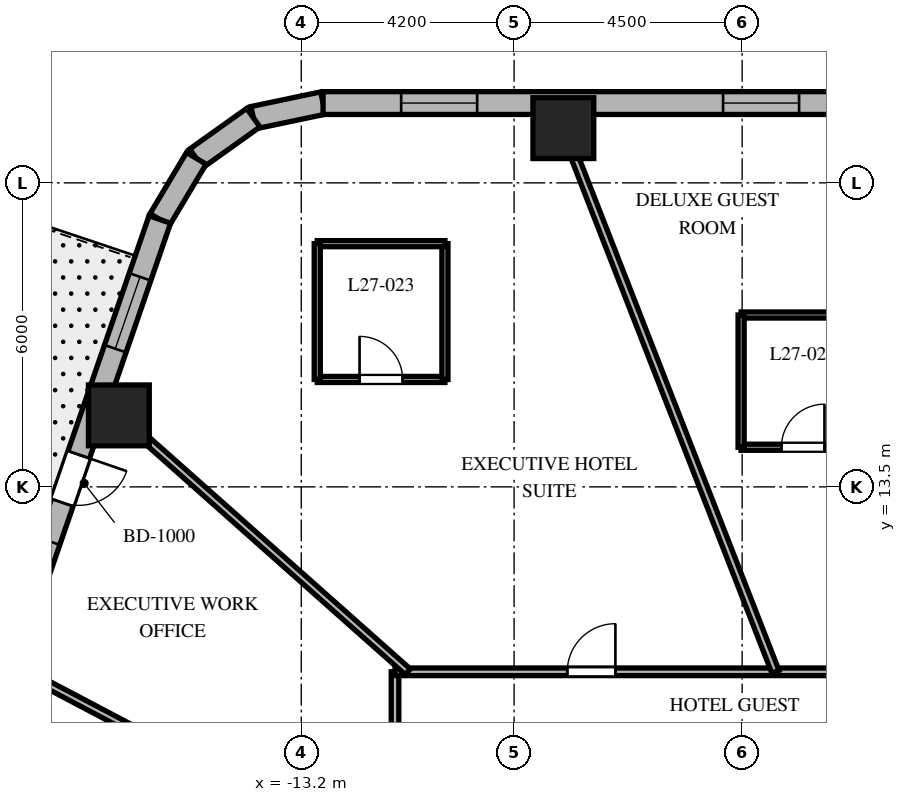
"""IFC4 building model, lengths in metres.
Left out: names, types, materials, properties, quantities, classifications, styles, units other than length and angle.
Written with IfcOpenShell. Run it as: python <this file> out.ifc"""

import sys

from ifc_helpers import new_model, si_unit, direction, frame, frame_2d, origin, origin_2d, place, context, subcontext, project, spatial, rectangle, extrude, element, fill, save


model = new_model("IFC4")
c1 = context("Model", 3, precision=1e-05, world=origin(), true_north=direction((0.0, 1.0)))
c2 = subcontext(c1, "Body", "Model", "MODEL_VIEW")
j1 = project(units=[si_unit("LENGTHUNIT", "METRE"), si_unit("PLANEANGLEUNIT", "RADIAN")], contexts=[c1])
p1 = place(None, origin())
s1 = spatial("IfcSite", under=j1, at=p1, CompositionType="ELEMENT")
p2 = place(p1, origin())
s2 = spatial("IfcBuilding", under=s1, at=p2, CompositionType="ELEMENT")
p3 = place(p2, frame((0.0, 0.0, 113.6)))
s3 = spatial("IfcBuildingStorey", under=s2, at=p3, CompositionType="ELEMENT", Elevation=113.6)
for number, where, z_axis, x_axis in (
    (1, (-8.028, 20.58, 0.0), (0.0, 0.0, 1.0), (1.0, 0.0, 0.0)),
    (2, (-16.8, 14.911, 0.0), (0.0, 0.0, 1.0), (1.0, 0.0, 0.0)),
):
    element("IfcColumn", number, at=place(p3, frame(where, z_axis=z_axis, x_axis=x_axis)), inside=s3, PredefinedType="COLUMN", context=c2, shape_type="SweptSolid", body=[
        extrude(rectangle(XDim=1.2, YDim=1.2, at=origin_2d()), origin(), (0.0, 0.0, 1.0), 3.7),
    ])
p4 = place(p3, frame((-12.771, 21.075, 0.0), z_axis=(0.0, 0.0, 1.0), x_axis=(-0.97874281988, -0.205091424819, 0.0)))
e3 = element("IfcWall", 3, at=p4, inside=s3, PredefinedType="SOLIDWALL", context=c2, shape_type="SweptSolid", body=[
    extrude(rectangle(XDim=1.406, YDim=0.45, at=frame_2d((0.703, 0.0))), origin(), (0.0, 0.0, 1.0), 3.4),
])
p5 = place(p3, frame((-14.146, 20.787, 0.0), z_axis=(0.0, 0.0, 1.0), x_axis=(-0.814162929117, -0.580636482536, 0.0)))
e4 = element("IfcWall", 4, at=p5, inside=s3, PredefinedType="SOLIDWALL", context=c2, shape_type="SweptSolid", body=[
    extrude(rectangle(XDim=1.382, YDim=0.45, at=frame_2d((0.691, 0.0))), origin(), (0.0, 0.0, 1.0), 3.4),
])
p6 = place(p3, frame((-15.272, 19.984, 0.0), z_axis=(0.0, 0.0, 1.0), x_axis=(-0.512579347361, -0.858639862025, 0.0)))
e5 = element("IfcWall", 5, at=p6, inside=s3, PredefinedType="SOLIDWALL", context=c2, shape_type="SweptSolid", body=[
    extrude(rectangle(XDim=1.406, YDim=0.45, at=frame_2d((0.703, 0.0))), origin(), (0.0, 0.0, 1.0), 3.4),
])
p7 = place(p3, frame((11.012, 21.075, 0.0), z_axis=(0.0, 0.0, 1.0), x_axis=(-1.0, 0.0, 0.0)))
e6 = element("IfcWall", 6, at=p7, inside=s3, PredefinedType="SOLIDWALL", context=c2, shape_type="SweptSolid", body=[
    extrude(rectangle(XDim=23.782, YDim=0.45, at=frame_2d((11.891, 0.0))), origin(), (0.0, 0.0, 1.0), 3.4),
])
p8 = place(p7, frame((1.542, 0.0, 0.8)))
e7 = element("IfcOpeningElement", 7, at=p8, cuts=e6, PredefinedType="OPENING", context=c2, shape_type="SweptSolid", body=[
    extrude(rectangle(XDim=1.5, YDim=1.8, at=frame_2d((0.75, 0.9))), frame((0.0, 0.235, 0.0), z_axis=(0.0, -1.0, 0.0), x_axis=(1.0, 0.0, 0.0)), (0.0, 0.0, 1.0), 0.47),
])
p9 = place(p7, frame((7.82, 0.0, 0.8)))
e8 = element("IfcOpeningElement", 8, at=p9, cuts=e6, PredefinedType="OPENING", context=c2, shape_type="SweptSolid", body=[
    extrude(rectangle(XDim=1.5, YDim=1.8, at=frame_2d((0.75, 0.9))), frame((0.0, 0.235, 0.0), z_axis=(0.0, -1.0, 0.0), x_axis=(1.0, 0.0, 0.0)), (0.0, 0.0, 1.0), 0.47),
])
p10 = place(p7, frame((14.388, 0.0, 0.8)))
e9 = element("IfcOpeningElement", 9, at=p10, cuts=e6, PredefinedType="OPENING", context=c2, shape_type="SweptSolid", body=[
    extrude(rectangle(XDim=1.5, YDim=1.8, at=frame_2d((0.75, 0.9))), frame((0.0, 0.235, 0.0), z_axis=(0.0, -1.0, 0.0), x_axis=(1.0, 0.0, 0.0)), (0.0, 0.0, 1.0), 0.47),
])
p11 = place(p7, frame((20.741, 0.0, 0.8)))
e10 = element("IfcOpeningElement", 10, at=p11, cuts=e6, PredefinedType="OPENING", context=c2, shape_type="SweptSolid", body=[
    extrude(rectangle(XDim=1.5, YDim=1.8, at=frame_2d((0.75, 0.9))), frame((0.0, 0.235, 0.0), z_axis=(0.0, -1.0, 0.0), x_axis=(1.0, 0.0, 0.0)), (0.0, 0.0, 1.0), 0.47),
])
p12 = place(p3, frame((-15.992, 18.777, 0.0), z_axis=(0.0, 0.0, 1.0), x_axis=(-0.325606988926, -0.945505202927, 0.0)))
e11 = element("IfcWall", 11, at=p12, inside=s3, PredefinedType="SOLIDWALL", context=c2, shape_type="SweptSolid", body=[
    extrude(rectangle(XDim=19.669, YDim=0.45, at=frame_2d((9.835, 0.0))), origin(), (0.0, 0.0, 1.0), 3.4),
])
p13 = place(p12, frame((4.909, 0.0, 0.0)))
e12 = element("IfcOpeningElement", 12, at=p13, cuts=e11, PredefinedType="OPENING", context=c2, shape_type="SweptSolid", body=[
    extrude(rectangle(XDim=1.0, YDim=2.15, at=frame_2d((0.5, 1.075))), frame((0.0, 0.235, 0.0), z_axis=(0.0, -1.0, 0.0), x_axis=(1.0, 0.0, 0.0)), (0.0, 0.0, 1.0), 0.47),
])
p14 = place(p12, frame((1.197, 0.0, 0.8)))
e13 = element("IfcOpeningElement", 13, at=p14, cuts=e11, PredefinedType="OPENING", context=c2, shape_type="SweptSolid", body=[
    extrude(rectangle(XDim=1.5, YDim=1.8, at=frame_2d((0.75, 0.9))), frame((0.0, 0.235, 0.0), z_axis=(0.0, -1.0, 0.0), x_axis=(1.0, 0.0, 0.0)), (0.0, 0.0, 1.0), 0.47),
])
p15 = place(p12, frame((6.714, 0.0, 0.8)))
e14 = element("IfcOpeningElement", 14, at=p15, cuts=e11, PredefinedType="OPENING", context=c2, shape_type="SweptSolid", body=[
    extrude(rectangle(XDim=1.5, YDim=1.8, at=frame_2d((0.75, 0.9))), frame((0.0, 0.235, 0.0), z_axis=(0.0, -1.0, 0.0), x_axis=(1.0, 0.0, 0.0)), (0.0, 0.0, 1.0), 0.47),
])
p16 = place(p12, frame((11.53, 0.0, 0.8)))
e15 = element("IfcOpeningElement", 15, at=p16, cuts=e11, PredefinedType="OPENING", context=c2, shape_type="SweptSolid", body=[
    extrude(rectangle(XDim=1.5, YDim=1.8, at=frame_2d((0.75, 0.9))), frame((0.0, 0.235, 0.0), z_axis=(0.0, -1.0, 0.0), x_axis=(1.0, 0.0, 0.0)), (0.0, 0.0, 1.0), 0.47),
])
p17 = place(p12, frame((16.918, 0.0, 0.8)))
e16 = element("IfcOpeningElement", 16, at=p17, cuts=e11, PredefinedType="OPENING", context=c2, shape_type="SweptSolid", body=[
    extrude(rectangle(XDim=1.5, YDim=1.8, at=frame_2d((0.75, 0.9))), frame((0.0, 0.235, 0.0), z_axis=(0.0, -1.0, 0.0), x_axis=(1.0, 0.0, 0.0)), (0.0, 0.0, 1.0), 0.47),
])
p18 = place(p3, frame((-11.35, -9.85, 0.0), z_axis=(0.0, 0.0, 1.0), x_axis=(0.0, 1.0, 0.0)))
e17 = element("IfcWall", 17, at=p18, inside=s3, PredefinedType="PARTITIONING", context=c2, shape_type="SweptSolid", body=[
    extrude(rectangle(XDim=19.7, YDim=0.15, at=frame_2d((9.85, 0.0))), origin(), (0.0, 0.0, 1.0), 2.84),
])
p19 = place(p18, frame((17.197, 0.0, 0.0)))
e18 = element("IfcOpeningElement", 18, at=p19, cuts=e17, PredefinedType="OPENING", context=c2, shape_type="SweptSolid", body=[
    extrude(rectangle(XDim=0.9, YDim=2.03, at=frame_2d((0.45, 1.015))), frame((0.0, 0.085, 0.0), z_axis=(0.0, -1.0, 0.0), x_axis=(1.0, 0.0, 0.0)), (0.0, 0.0, 1.0), 0.17),
])
p20 = place(p18, frame((13.408, 0.0, 0.0)))
e19 = element("IfcOpeningElement", 19, at=p20, cuts=e17, PredefinedType="OPENING", context=c2, shape_type="SweptSolid", body=[
    extrude(rectangle(XDim=0.95, YDim=2.03, at=frame_2d((0.475, 1.015))), frame((0.0, 0.085, 0.0), z_axis=(0.0, -1.0, 0.0), x_axis=(1.0, 0.0, 0.0)), (0.0, 0.0, 1.0), 0.17),
])
p21 = place(p18, frame((8.836, 0.0, 0.0)))
e20 = element("IfcOpeningElement", 20, at=p21, cuts=e17, PredefinedType="OPENING", context=c2, shape_type="SweptSolid", body=[
    extrude(rectangle(XDim=0.95, YDim=2.03, at=frame_2d((0.475, 1.015))), frame((0.0, 0.085, 0.0), z_axis=(0.0, -1.0, 0.0), x_axis=(1.0, 0.0, 0.0)), (0.0, 0.0, 1.0), 0.17),
])
p22 = place(p18, frame((4.199, 0.0, 0.0)))
e21 = element("IfcOpeningElement", 21, at=p22, cuts=e17, PredefinedType="OPENING", context=c2, shape_type="SweptSolid", body=[
    extrude(rectangle(XDim=0.95, YDim=2.03, at=frame_2d((0.475, 1.015))), frame((0.0, 0.085, 0.0), z_axis=(0.0, -1.0, 0.0), x_axis=(1.0, 0.0, 0.0)), (0.0, 0.0, 1.0), 0.17),
])
p23 = place(p18, frame((1.002, 0.0, 0.0)))
e22 = element("IfcOpeningElement", 22, at=p23, cuts=e17, PredefinedType="OPENING", context=c2, shape_type="SweptSolid", body=[
    extrude(rectangle(XDim=0.9, YDim=2.03, at=frame_2d((0.45, 1.015))), frame((0.0, 0.085, 0.0), z_axis=(0.0, -1.0, 0.0), x_axis=(1.0, 0.0, 0.0)), (0.0, 0.0, 1.0), 0.17),
])
p24 = place(p3, frame((-11.35, 9.85, 0.0), z_axis=(0.0, 0.0, 1.0), x_axis=(1.0, 0.0, 0.0)))
e23 = element("IfcWall", 23, at=p24, inside=s3, PredefinedType="PARTITIONING", context=c2, shape_type="SweptSolid", body=[
    extrude(rectangle(XDim=22.7, YDim=0.15, at=frame_2d((11.35, 0.0))), origin(), (0.0, 0.0, 1.0), 2.84),
])
p25 = place(p24, frame((17.237, 0.0, 0.0)))
e24 = element("IfcOpeningElement", 24, at=p25, cuts=e23, PredefinedType="OPENING", context=c2, shape_type="SweptSolid", body=[
    extrude(rectangle(XDim=0.95, YDim=2.03, at=frame_2d((0.475, 1.015))), frame((0.0, 0.085, 0.0), z_axis=(0.0, -1.0, 0.0), x_axis=(1.0, 0.0, 0.0)), (0.0, 0.0, 1.0), 0.17),
])
p26 = place(p24, frame((12.192, 0.0, 0.0)))
e25 = element("IfcOpeningElement", 25, at=p26, cuts=e23, PredefinedType="OPENING", context=c2, shape_type="SweptSolid", body=[
    extrude(rectangle(XDim=0.95, YDim=2.03, at=frame_2d((0.475, 1.015))), frame((0.0, 0.085, 0.0), z_axis=(0.0, -1.0, 0.0), x_axis=(1.0, 0.0, 0.0)), (0.0, 0.0, 1.0), 0.17),
])
p27 = place(p24, frame((8.757, 0.0, 0.0)))
e26 = element("IfcOpeningElement", 26, at=p27, cuts=e23, PredefinedType="OPENING", context=c2, shape_type="SweptSolid", body=[
    extrude(rectangle(XDim=0.95, YDim=2.03, at=frame_2d((0.475, 1.015))), frame((0.0, 0.085, 0.0), z_axis=(0.0, -1.0, 0.0), x_axis=(1.0, 0.0, 0.0)), (0.0, 0.0, 1.0), 0.17),
])
p28 = place(p24, frame((3.399, 0.0, 0.0)))
e27 = element("IfcOpeningElement", 27, at=p28, cuts=e23, PredefinedType="OPENING", context=c2, shape_type="SweptSolid", body=[
    extrude(rectangle(XDim=0.95, YDim=2.03, at=frame_2d((0.475, 1.015))), frame((0.0, 0.085, 0.0), z_axis=(0.0, -1.0, 0.0), x_axis=(1.0, 0.0, 0.0)), (0.0, 0.0, 1.0), 0.17),
])
p29 = place(p3, frame((-3.842, 9.85, 0.0), z_axis=(0.0, 0.0, 1.0), x_axis=(-0.363432685593, 0.931620460833, 0.0)))
e28 = element("IfcWall", 28, at=p29, inside=s3, PredefinedType="PARTITIONING", context=c2, shape_type="SweptSolid", body=[
    extrude(rectangle(XDim=12.049, YDim=0.15, at=frame_2d((6.024, 0.0))), origin(), (0.0, 0.0, 1.0), 2.54),
])
p30 = place(p3, frame((-11.098, 9.85, 0.0), z_axis=(0.0, 0.0, 1.0), x_axis=(-0.747904295103, 0.663806572253, 0.0)))
e29 = element("IfcWall", 29, at=p30, inside=s3, PredefinedType="PARTITIONING", context=c2, shape_type="SweptSolid", body=[
    extrude(rectangle(XDim=8.16, YDim=0.15, at=frame_2d((4.08, 0.0))), origin(), (0.0, 0.0, 1.0), 2.54),
])
p31 = place(p3, frame((-11.35, 5.983, 0.0), z_axis=(0.0, 0.0, 1.0), x_axis=(-0.884597447182, 0.466355397137, 0.0)))
e30 = element("IfcWall", 30, at=p31, inside=s3, PredefinedType="PARTITIONING", context=c2, shape_type="SweptSolid", body=[
    extrude(rectangle(XDim=8.657, YDim=0.15, at=frame_2d((4.328, 0.0))), origin(), (0.0, 0.0, 1.0), 2.54),
])
p32 = place(p3, frame((-4.52, 14.282, 0.0), z_axis=(0.0, 0.0, 1.0), x_axis=(1.0, 0.0, 0.0)))
e31 = element("IfcWall", 31, at=p32, inside=s3, PredefinedType="PARTITIONING", context=c2, shape_type="SweptSolid", body=[
    extrude(rectangle(XDim=2.44, YDim=0.12, at=frame_2d((1.22, 0.0))), origin(), (0.0, 0.0, 1.0), 3.4),
])
p33 = place(p32, frame((0.795, 0.0, 0.0)))
e32 = element("IfcOpeningElement", 32, at=p33, cuts=e31, PredefinedType="OPENING", context=c2, shape_type="SweptSolid", body=[
    extrude(rectangle(XDim=0.85, YDim=2.03, at=frame_2d((0.425, 1.015))), frame((0.0, 0.07, 0.0), z_axis=(0.0, -1.0, 0.0), x_axis=(1.0, 0.0, 0.0)), (0.0, 0.0, 1.0), 0.14),
])
p34 = place(p3, frame((-2.08, 16.892, 0.0), z_axis=(0.0, 0.0, 1.0), x_axis=(-1.0, 0.0, 0.0)))
e33 = element("IfcWall", 33, at=p34, inside=s3, PredefinedType="PARTITIONING", context=c2, shape_type="SweptSolid", body=[
    extrude(rectangle(XDim=2.44, YDim=0.12, at=frame_2d((1.22, 0.0))), origin(), (0.0, 0.0, 1.0), 3.4),
])
p35 = place(p3, frame((-4.52, 16.892, 0.0), z_axis=(0.0, 0.0, 1.0), x_axis=(0.0, -1.0, 0.0)))
e34 = element("IfcWall", 34, at=p35, inside=s3, PredefinedType="PARTITIONING", context=c2, shape_type="SweptSolid", body=[
    extrude(rectangle(XDim=2.61, YDim=0.12, at=frame_2d((1.305, 0.0))), origin(), (0.0, 0.0, 1.0), 2.84),
])
p36 = place(p3, frame((-12.885, 15.62, 0.0), z_axis=(0.0, 0.0, 1.0), x_axis=(1.0, 0.0, 0.0)))
e35 = element("IfcWall", 35, at=p36, inside=s3, PredefinedType="PARTITIONING", context=c2, shape_type="SweptSolid", body=[
    extrude(rectangle(XDim=2.52, YDim=0.12, at=frame_2d((1.26, 0.0))), origin(), (0.0, 0.0, 1.0), 3.4),
])
p37 = place(p36, frame((0.835, 0.0, 0.0)))
e36 = element("IfcOpeningElement", 36, at=p37, cuts=e35, PredefinedType="OPENING", context=c2, shape_type="SweptSolid", body=[
    extrude(rectangle(XDim=0.85, YDim=2.03, at=frame_2d((0.425, 1.015))), frame((0.0, 0.07, 0.0), z_axis=(0.0, -1.0, 0.0), x_axis=(1.0, 0.0, 0.0)), (0.0, 0.0, 1.0), 0.14),
])
p38 = place(p3, frame((-10.365, 15.62, 0.0), z_axis=(0.0, 0.0, 1.0), x_axis=(0.0, 1.0, 0.0)))
e37 = element("IfcWall", 37, at=p38, inside=s3, PredefinedType="PARTITIONING", context=c2, shape_type="SweptSolid", body=[
    extrude(rectangle(XDim=2.68, YDim=0.12, at=frame_2d((1.34, 0.0))), origin(), (0.0, 0.0, 1.0), 3.4),
])
p39 = place(p3, frame((-10.365, 18.3, 0.0), z_axis=(0.0, 0.0, 1.0), x_axis=(-1.0, 0.0, 0.0)))
e38 = element("IfcWall", 38, at=p39, inside=s3, PredefinedType="PARTITIONING", context=c2, shape_type="SweptSolid", body=[
    extrude(rectangle(XDim=2.52, YDim=0.12, at=frame_2d((1.26, 0.0))), origin(), (0.0, 0.0, 1.0), 2.54),
])
p40 = place(p3, frame((-12.885, 18.3, 0.0), z_axis=(0.0, 0.0, 1.0), x_axis=(0.0, -1.0, 0.0)))
e39 = element("IfcWall", 39, at=p40, inside=s3, PredefinedType="PARTITIONING", context=c2, shape_type="SweptSolid", body=[
    extrude(rectangle(XDim=2.68, YDim=0.12, at=frame_2d((1.34, 0.0))), origin(), (0.0, 0.0, 1.0), 2.54),
])
p41 = place(p10, origin())
e40 = element("IfcWindow", 40, at=p41, inside=s3, PartitioningType="SINGLE_PANEL", PredefinedType="WINDOW", context=c2, shape_type="SweptSolid", body=[
    extrude(rectangle(XDim=1.5, YDim=1.8, at=frame_2d((0.75, 0.9))), frame((0.0, 0.03, 0.0), z_axis=(0.0, -1.0, 0.0), x_axis=(1.0, 0.0, 0.0)), (0.0, 0.0, 1.0), 0.06),
])
fill(e9, e40)
p42 = place(p11, origin())
e41 = element("IfcWindow", 41, at=p42, inside=s3, PartitioningType="SINGLE_PANEL", PredefinedType="WINDOW", context=c2, shape_type="SweptSolid", body=[
    extrude(rectangle(XDim=1.5, YDim=1.8, at=frame_2d((0.75, 0.9))), frame((0.0, 0.03, 0.0), z_axis=(0.0, -1.0, 0.0), x_axis=(1.0, 0.0, 0.0)), (0.0, 0.0, 1.0), 0.06),
])
fill(e10, e41)
p43 = place(p13, origin())
e42 = element("IfcDoor", 42, at=p43, inside=s3, OperationType="SINGLE_SWING_LEFT", PredefinedType="DOOR", context=c2, shape_type="SweptSolid", body=[
    extrude(rectangle(XDim=1.0, YDim=2.15, at=frame_2d((0.5, 1.075))), frame((0.0, 0.025, 0.0), z_axis=(0.0, -1.0, 0.0), x_axis=(1.0, 0.0, 0.0)), (0.0, 0.0, 1.0), 0.05),
])
fill(e12, e42)
p44 = place(p14, origin())
e43 = element("IfcWindow", 43, at=p44, inside=s3, PartitioningType="SINGLE_PANEL", PredefinedType="WINDOW", context=c2, shape_type="SweptSolid", body=[
    extrude(rectangle(XDim=1.5, YDim=1.8, at=frame_2d((0.75, 0.9))), frame((0.0, 0.03, 0.0), z_axis=(0.0, -1.0, 0.0), x_axis=(1.0, 0.0, 0.0)), (0.0, 0.0, 1.0), 0.06),
])
fill(e13, e43)
p45 = place(p33, origin())
e44 = element("IfcDoor", 44, at=p45, inside=s3, OperationType="SINGLE_SWING_RIGHT", PredefinedType="DOOR", context=c2, shape_type="SweptSolid", body=[
    extrude(rectangle(XDim=0.85, YDim=2.03, at=frame_2d((0.425, 1.015))), frame((0.0, 0.025, 0.0), z_axis=(0.0, -1.0, 0.0), x_axis=(1.0, 0.0, 0.0)), (0.0, 0.0, 1.0), 0.05),
])
fill(e32, e44)
p46 = place(p28, origin())
e45 = element("IfcDoor", 45, at=p46, inside=s3, OperationType="SINGLE_SWING_RIGHT", PredefinedType="DOOR", context=c2, shape_type="SweptSolid", body=[
    extrude(rectangle(XDim=0.95, YDim=2.03, at=frame_2d((0.475, 1.015))), frame((0.0, 0.025, 0.0), z_axis=(0.0, -1.0, 0.0), x_axis=(1.0, 0.0, 0.0)), (0.0, 0.0, 1.0), 0.05),
])
fill(e27, e45)
p47 = place(p37, origin())
e46 = element("IfcDoor", 46, at=p47, inside=s3, OperationType="SINGLE_SWING_LEFT", PredefinedType="DOOR", context=c2, shape_type="SweptSolid", body=[
    extrude(rectangle(XDim=0.85, YDim=2.03, at=frame_2d((0.425, 1.015))), frame((0.0, 0.025, 0.0), z_axis=(0.0, -1.0, 0.0), x_axis=(1.0, 0.0, 0.0)), (0.0, 0.0, 1.0), 0.05),
])
fill(e36, e46)
save(model, sys.argv[1])
